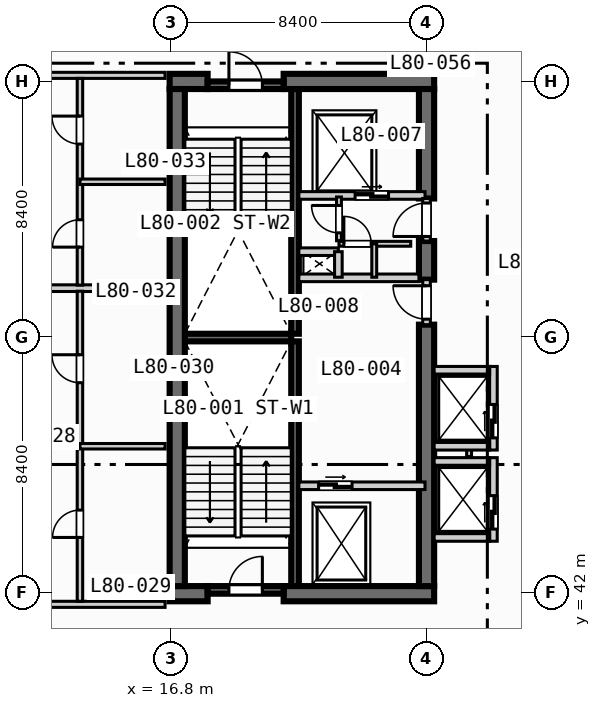
"""IFC4 building model, lengths in metres.
Left out: names, types, materials, properties, quantities, classifications, styles, units other than length and angle.
Written with IfcOpenShell. Run it as: python <this file> out.ifc"""

import sys

from ifc_helpers import new_model, si_unit, direction, frame, frame_2d, origin, place, context, subcontext, project, spatial, rectangle, extrude, element, fill, save


model = new_model("IFC4")
c1 = context("Model", 3, precision=1e-05, world=origin(), true_north=direction((0.0, 1.0)))
c2 = subcontext(c1, "Body", "Model", "MODEL_VIEW")
j1 = project(units=[si_unit("LENGTHUNIT", "METRE"), si_unit("PLANEANGLEUNIT", "RADIAN")], contexts=[c1])
p1 = place(None, origin())
s1 = spatial("IfcSite", under=j1, at=p1, CompositionType="ELEMENT")
p2 = place(p1, origin())
s2 = spatial("IfcBuilding", under=s1, at=p2, CompositionType="ELEMENT")
p3 = place(p2, frame((0.0, 0.0, 324.2)))
s3 = spatial("IfcBuildingStorey", under=s2, at=p3, CompositionType="ELEMENT", Elevation=324.2)
for number, where, z_axis, x_axis in (
    (1, (20.875, 42.2, 0.0), (0.0, 0.0, 1.0), (0.0, 1.0, 0.0)),
    (2, (20.875, 50.5, 0.0), (0.0, 0.0, 1.0), (0.0, 1.0, 0.0)),
):
    element("IfcWall", number, at=place(p3, frame(where, z_axis=z_axis, x_axis=x_axis)), inside=s3, PredefinedType="SOLIDWALL", context=c2, shape_type="SweptSolid", body=[
        extrude(rectangle(XDim=8.05, YDim=0.25, at=frame_2d((4.025, 0.0))), origin(), (0.0, 0.0, 1.0), 3.67),
    ])
p4 = place(p3, frame((17.25, 50.375, 0.0), z_axis=(0.0, 0.0, 1.0), x_axis=(1.0, 0.0, 0.0)))
e3 = element("IfcWall", 3, at=p4, inside=s3, PredefinedType="SOLIDWALL", context=c2, shape_type="SweptSolid", body=[
    extrude(rectangle(XDim=3.5, YDim=0.25, at=frame_2d((1.75, 0.0))), origin(), (0.0, 0.0, 1.0), 3.67),
])
p5 = place(p3, frame((16.75, 41.95, 0.0), z_axis=(0.0, 0.0, 1.0), x_axis=(1.0, 0.0, 0.0)))
e4 = element("IfcWall", 4, at=p5, inside=s3, PredefinedType="SHEAR", context=c2, shape_type="SweptSolid", body=[
    extrude(rectangle(XDim=1.25, YDim=0.5, at=frame_2d((0.625, 0.0))), origin(), (0.0, 0.0, 1.0), 3.67),
])
p6 = place(p3, frame((20.5, 41.95, 0.0), z_axis=(0.0, 0.0, 1.0), x_axis=(1.0, 0.0, 0.0)))
e5 = element("IfcWall", 5, at=p6, inside=s3, PredefinedType="SHEAR", context=c2, shape_type="SweptSolid", body=[
    extrude(rectangle(XDim=4.95, YDim=0.5, at=frame_2d((2.475, 0.0))), origin(), (0.0, 0.0, 1.0), 3.67),
])
p7 = place(p3, frame((16.75, 58.8, 0.0), z_axis=(0.0, 0.0, 1.0), x_axis=(1.0, 0.0, 0.0)))
e6 = element("IfcWall", 6, at=p7, inside=s3, PredefinedType="SHEAR", context=c2, shape_type="SweptSolid", body=[
    extrude(rectangle(XDim=1.25, YDim=0.5, at=frame_2d((0.625, 0.0))), origin(), (0.0, 0.0, 1.0), 3.67),
])
p8 = place(p3, frame((20.5, 58.8, 0.0), z_axis=(0.0, 0.0, 1.0), x_axis=(1.0, 0.0, 0.0)))
e7 = element("IfcWall", 7, at=p8, inside=s3, PredefinedType="SHEAR", context=c2, shape_type="SweptSolid", body=[
    extrude(rectangle(XDim=4.95, YDim=0.5, at=frame_2d((2.475, 0.0))), origin(), (0.0, 0.0, 1.0), 3.67),
])
p9 = place(p3, frame((17.0, 42.2, 0.0), z_axis=(0.0, 0.0, 1.0), x_axis=(0.0, 1.0, 0.0)))
e8 = element("IfcWall", 8, at=p9, inside=s3, PredefinedType="SHEAR", context=c2, shape_type="SweptSolid", body=[
    extrude(rectangle(XDim=16.35, YDim=0.5, at=frame_2d((8.175, 0.0))), origin(), (0.0, 0.0, 1.0), 3.67),
])
p10 = place(p3, frame((25.2, 42.2, 0.0), z_axis=(0.0, 0.0, 1.0), x_axis=(0.0, 1.0, 0.0)))
e9 = element("IfcWall", 9, at=p10, inside=s3, PredefinedType="SHEAR", context=c2, shape_type="SweptSolid", body=[
    extrude(rectangle(XDim=8.6, YDim=0.5, at=frame_2d((4.3, 0.0))), origin(), (0.0, 0.0, 1.0), 3.67),
])
p11 = place(p3, frame((25.2, 52.28, 0.0), z_axis=(0.0, 0.0, 1.0), x_axis=(0.0, 1.0, 0.0)))
e10 = element("IfcWall", 10, at=p11, inside=s3, PredefinedType="SHEAR", context=c2, shape_type="SweptSolid", body=[
    extrude(rectangle(XDim=1.27, YDim=0.5, at=frame_2d((0.635, 0.0))), origin(), (0.0, 0.0, 1.0), 3.67),
])
p12 = place(p3, frame((25.2, 54.95, 0.0), z_axis=(0.0, 0.0, 1.0), x_axis=(0.0, 1.0, 0.0)))
e11 = element("IfcWall", 11, at=p12, inside=s3, PredefinedType="SHEAR", context=c2, shape_type="SweptSolid", body=[
    extrude(rectangle(XDim=3.6, YDim=0.5, at=frame_2d((1.8, 0.0))), origin(), (0.0, 0.0, 1.0), 3.67),
])
p13 = place(p3, frame((18.0, 42.075, 0.0), z_axis=(0.0, 0.0, 1.0), x_axis=(1.0, 0.0, 0.0)))
e12 = element("IfcWall", 12, at=p13, inside=s3, PredefinedType="SOLIDWALL", context=c2, shape_type="SweptSolid", body=[
    extrude(rectangle(XDim=2.5, YDim=0.25, at=frame_2d((1.25, 0.0))), origin(), (0.0, 0.0, 1.0), 3.67),
])
p14 = place(p13, frame((0.7, 0.0, 0.0)))
e13 = element("IfcOpeningElement", 13, at=p14, cuts=e12, PredefinedType="OPENING", context=c2, shape_type="SweptSolid", body=[
    extrude(rectangle(XDim=1.1, YDim=2.15, at=frame_2d((0.55, 1.075))), frame((0.0, 0.135, 0.0), z_axis=(0.0, -1.0, 0.0), x_axis=(1.0, 0.0, 0.0)), (0.0, 0.0, 1.0), 0.27),
])
p15 = place(p3, frame((18.0, 58.675, 0.0), z_axis=(0.0, 0.0, 1.0), x_axis=(1.0, 0.0, 0.0)))
e14 = element("IfcWall", 14, at=p15, inside=s3, PredefinedType="SOLIDWALL", context=c2, shape_type="SweptSolid", body=[
    extrude(rectangle(XDim=2.5, YDim=0.25, at=frame_2d((1.25, 0.0))), origin(), (0.0, 0.0, 1.0), 3.67),
])
p16 = place(p15, frame((0.7, 0.0, 0.0)))
e15 = element("IfcOpeningElement", 15, at=p16, cuts=e14, PredefinedType="OPENING", context=c2, shape_type="SweptSolid", body=[
    extrude(rectangle(XDim=1.1, YDim=2.15, at=frame_2d((0.55, 1.075))), frame((0.0, 0.135, 0.0), z_axis=(0.0, -1.0, 0.0), x_axis=(1.0, 0.0, 0.0)), (0.0, 0.0, 1.0), 0.27),
])
p17 = place(p3, frame((21.0, 45.5, 0.0), z_axis=(0.0, 0.0, 1.0), x_axis=(1.0, 0.0, 0.0)))
e16 = element("IfcWall", 16, at=p17, inside=s3, PredefinedType="SOLIDWALL", context=c2, shape_type="SweptSolid", body=[
    extrude(rectangle(XDim=4.15, YDim=0.25, at=frame_2d((2.075, 0.0))), origin(), (0.0, 0.0, 1.0), 3.67),
])
p18 = place(p17, frame((0.65, 0.0, 0.0)))
e17 = element("IfcOpeningElement", 17, at=p18, cuts=e16, PredefinedType="OPENING", context=c2, shape_type="SweptSolid", body=[
    extrude(rectangle(XDim=1.1, YDim=2.15, at=frame_2d((0.55, 1.075))), frame((0.0, 0.135, 0.0), z_axis=(0.0, -1.0, 0.0), x_axis=(1.0, 0.0, 0.0)), (0.0, 0.0, 1.0), 0.27),
])
p19 = place(p3, frame((25.2, 50.8, 0.0), z_axis=(0.0, 0.0, 1.0), x_axis=(0.0, 1.0, 0.0)))
e18 = element("IfcWall", 18, at=p19, inside=s3, PredefinedType="SOLIDWALL", context=c2, shape_type="SweptSolid", body=[
    extrude(rectangle(XDim=1.48, YDim=0.25, at=frame_2d((0.74, 0.0))), origin(), (0.0, 0.0, 1.0), 3.67),
])
p20 = place(p19, frame((0.18, 0.0, 0.0)))
e19 = element("IfcOpeningElement", 19, at=p20, cuts=e18, PredefinedType="OPENING", context=c2, shape_type="SweptSolid", body=[
    extrude(rectangle(XDim=1.1, YDim=2.15, at=frame_2d((0.55, 1.075))), frame((0.0, 0.135, 0.0), z_axis=(0.0, -1.0, 0.0), x_axis=(1.0, 0.0, 0.0)), (0.0, 0.0, 1.0), 0.27),
])
p21 = place(p3, frame((21.0, 52.34, 0.0), z_axis=(0.0, 0.0, 1.0), x_axis=(1.0, 0.0, 0.0)))
e20 = element("IfcWall", 20, at=p21, inside=s3, PredefinedType="SOLIDWALL", context=c2, shape_type="SweptSolid", body=[
    extrude(rectangle(XDim=3.95, YDim=0.25, at=frame_2d((1.975, 0.0))), origin(), (0.0, 0.0, 1.0), 3.67),
])
p22 = place(p3, frame((21.0, 55.05, 0.0), z_axis=(0.0, 0.0, 1.0), x_axis=(1.0, 0.0, 0.0)))
e21 = element("IfcWall", 21, at=p22, inside=s3, PredefinedType="SOLIDWALL", context=c2, shape_type="SweptSolid", body=[
    extrude(rectangle(XDim=4.15, YDim=0.25, at=frame_2d((2.075, 0.0))), origin(), (0.0, 0.0, 1.0), 3.67),
])
p23 = place(p22, frame((1.85, 0.0, 0.0)))
e22 = element("IfcOpeningElement", 22, at=p23, cuts=e21, PredefinedType="OPENING", context=c2, shape_type="SweptSolid", body=[
    extrude(rectangle(XDim=1.1, YDim=2.15, at=frame_2d((0.55, 1.075))), frame((0.0, 0.135, 0.0), z_axis=(0.0, -1.0, 0.0), x_axis=(1.0, 0.0, 0.0)), (0.0, 0.0, 1.0), 0.27),
])
p24 = place(p3, frame((25.2, 53.55, 0.0), z_axis=(0.0, 0.0, 1.0), x_axis=(0.0, 1.0, 0.0)))
e23 = element("IfcWall", 23, at=p24, inside=s3, PredefinedType="SOLIDWALL", context=c2, shape_type="SweptSolid", body=[
    extrude(rectangle(XDim=1.4, YDim=0.25, at=frame_2d((0.7, 0.0))), origin(), (0.0, 0.0, 1.0), 3.67),
])
p25 = place(p24, frame((0.15, 0.0, 0.0)))
e24 = element("IfcOpeningElement", 24, at=p25, cuts=e23, PredefinedType="OPENING", context=c2, shape_type="SweptSolid", body=[
    extrude(rectangle(XDim=1.1, YDim=2.15, at=frame_2d((0.55, 1.075))), frame((0.0, 0.135, 0.0), z_axis=(0.0, -1.0, 0.0), x_axis=(1.0, 0.0, 0.0)), (0.0, 0.0, 1.0), 0.27),
])
p26 = place(p3, frame((21.0, 53.2, 0.0), z_axis=(0.0, 0.0, 1.0), x_axis=(1.0, 0.0, 0.0)))
e25 = element("IfcWall", 25, at=p26, inside=s3, PredefinedType="SOLIDWALL", context=c2, shape_type="SweptSolid", body=[
    extrude(rectangle(XDim=1.3, YDim=0.25, at=frame_2d((0.65, 0.0))), origin(), (0.0, 0.0, 1.0), 3.67),
])
p27 = place(p3, frame((22.3, 52.36, 0.0), z_axis=(0.0, 0.0, 1.0), x_axis=(0.0, 1.0, 0.0)))
e26 = element("IfcWall", 26, at=p27, inside=s3, PredefinedType="SOLIDWALL", context=c2, shape_type="SweptSolid", body=[
    extrude(rectangle(XDim=0.84, YDim=0.25, at=frame_2d((0.42, 0.0))), origin(), (0.0, 0.0, 1.0), 3.67),
])
p28 = place(p3, frame((22.32, 53.56, 0.0), z_axis=(0.0, 0.0, 1.0), x_axis=(0.0, 1.0, 0.0)))
e27 = element("IfcWall", 27, at=p28, inside=s3, PredefinedType="PARTITIONING", context=c2, shape_type="SweptSolid", body=[
    extrude(rectangle(XDim=1.44, YDim=0.16, at=frame_2d((0.72, 0.0))), origin(), (0.0, 0.0, 1.0), 3.67),
])
p29 = place(p28, frame((0.26, 0.0, 0.0)))
e28 = element("IfcOpeningElement", 28, at=p29, cuts=e27, PredefinedType="OPENING", context=c2, shape_type="SweptSolid", body=[
    extrude(rectangle(XDim=0.9, YDim=2.1, at=frame_2d((0.45, 1.05))), frame((0.0, 0.09, 0.0), z_axis=(0.0, -1.0, 0.0), x_axis=(1.0, 0.0, 0.0)), (0.0, 0.0, 1.0), 0.18),
])
p30 = place(p3, frame((22.32, 53.46, 0.0), z_axis=(0.0, 0.0, 1.0), x_axis=(1.0, 0.0, 0.0)))
e29 = element("IfcWall", 29, at=p30, inside=s3, PredefinedType="PARTITIONING", context=c2, shape_type="SweptSolid", body=[
    extrude(rectangle(XDim=2.36, YDim=0.16, at=frame_2d((1.18, 0.0))), origin(), (0.0, 0.0, 1.0), 3.67),
])
p31 = place(p30, frame((0.16, 0.0, 0.0)))
e30 = element("IfcOpeningElement", 30, at=p31, cuts=e29, PredefinedType="OPENING", context=c2, shape_type="SweptSolid", body=[
    extrude(rectangle(XDim=0.9, YDim=2.1, at=frame_2d((0.45, 1.05))), frame((0.0, 0.09, 0.0), z_axis=(0.0, -1.0, 0.0), x_axis=(1.0, 0.0, 0.0)), (0.0, 0.0, 1.0), 0.18),
])
p32 = place(p3, frame((23.48, 52.36, 0.0), z_axis=(0.0, 0.0, 1.0), x_axis=(0.0, 1.0, 0.0)))
e31 = element("IfcWall", 31, at=p32, inside=s3, PredefinedType="PARTITIONING", context=c2, shape_type="SweptSolid", body=[
    extrude(rectangle(XDim=1.1, YDim=0.16, at=frame_2d((0.55, 0.0))), origin(), (0.0, 0.0, 1.0), 3.67),
])
p33 = place(p3, frame((27.4, 43.675, 0.0), z_axis=(0.0, 0.0, 1.0), x_axis=(0.0, 1.0, 0.0)))
e32 = element("IfcWall", 32, at=p33, inside=s3, PredefinedType="SOLIDWALL", context=c2, shape_type="SweptSolid", body=[
    extrude(rectangle(XDim=2.75, YDim=0.25, at=frame_2d((1.375, 0.0))), origin(), (0.0, 0.0, 1.0), 3.67),
])
p34 = place(p33, frame((0.4, 0.0, 0.0)))
e33 = element("IfcOpeningElement", 33, at=p34, cuts=e32, PredefinedType="OPENING", context=c2, shape_type="SweptSolid", body=[
    extrude(rectangle(XDim=1.1, YDim=2.15, at=frame_2d((0.55, 1.075))), frame((0.0, 0.135, 0.0), z_axis=(0.0, -1.0, 0.0), x_axis=(1.0, 0.0, 0.0)), (0.0, 0.0, 1.0), 0.27),
])
for number, where, z_axis, x_axis in (
    (34, (25.45, 43.8, 0.0), (0.0, 0.0, 1.0), (1.0, 0.0, 0.0)),
    (35, (25.45, 46.3, 0.0), (0.0, 0.0, 1.0), (1.0, 0.0, 0.0)),
):
    element("IfcWall", number, at=place(p3, frame(where, z_axis=z_axis, x_axis=x_axis)), inside=s3, PredefinedType="SOLIDWALL", context=c2, shape_type="SweptSolid", body=[
        extrude(rectangle(XDim=1.825, YDim=0.25, at=frame_2d((0.913, 0.0))), origin(), (0.0, 0.0, 1.0), 3.67),
    ])
p35 = place(p3, frame((26.6, 46.46, 0.0), z_axis=(0.0, 0.0, 1.0), x_axis=(0.0, 1.0, 0.0)))
e36 = element("IfcWall", 36, at=p35, inside=s3, PredefinedType="PARTITIONING", context=c2, shape_type="SweptSolid", body=[
    extrude(rectangle(XDim=0.88, YDim=0.16, at=frame_2d((0.44, 0.0))), origin(), (0.0, 0.0, 1.0), 3.67),
])
p36 = place(p3, frame((27.4, 46.675, 0.0), z_axis=(0.0, 0.0, 1.0), x_axis=(0.0, 1.0, 0.0)))
e37 = element("IfcWall", 37, at=p36, inside=s3, PredefinedType="SOLIDWALL", context=c2, shape_type="SweptSolid", body=[
    extrude(rectangle(XDim=2.75, YDim=0.25, at=frame_2d((1.375, 0.0))), origin(), (0.0, 0.0, 1.0), 3.67),
])
p37 = place(p36, frame((0.4, 0.0, 0.0)))
e38 = element("IfcOpeningElement", 38, at=p37, cuts=e37, PredefinedType="OPENING", context=c2, shape_type="SweptSolid", body=[
    extrude(rectangle(XDim=1.1, YDim=2.15, at=frame_2d((0.55, 1.075))), frame((0.0, 0.135, 0.0), z_axis=(0.0, -1.0, 0.0), x_axis=(1.0, 0.0, 0.0)), (0.0, 0.0, 1.0), 0.27),
])
for number, where, z_axis, x_axis in (
    (39, (25.45, 46.8, 0.0), (0.0, 0.0, 1.0), (1.0, 0.0, 0.0)),
    (40, (25.45, 49.3, 0.0), (0.0, 0.0, 1.0), (1.0, 0.0, 0.0)),
):
    element("IfcWall", number, at=place(p3, frame(where, z_axis=z_axis, x_axis=x_axis)), inside=s3, PredefinedType="SOLIDWALL", context=c2, shape_type="SweptSolid", body=[
        extrude(rectangle(XDim=1.825, YDim=0.25, at=frame_2d((0.913, 0.0))), origin(), (0.0, 0.0, 1.0), 3.67),
    ])
p38 = place(p3, frame((8.65, 41.6, 0.0), z_axis=(0.0, 0.0, 1.0), x_axis=(1.0, 0.0, 0.0)))
e41 = element("IfcWall", 41, at=p38, inside=s3, PredefinedType="PARTITIONING", context=c2, shape_type="SweptSolid", body=[
    extrude(rectangle(XDim=7.95, YDim=0.2, at=frame_2d((3.975, 0.0))), origin(), (0.0, 0.0, 1.0), 3.67),
])
p39 = place(p38, frame((2.0, 0.0, 0.0)))
e42 = element("IfcOpeningElement", 42, at=p39, cuts=e41, PredefinedType="OPENING", context=c2, shape_type="SweptSolid", body=[
    extrude(rectangle(XDim=1.0, YDim=2.15, at=frame_2d((0.5, 1.075))), frame((0.0, 0.11, 0.0), z_axis=(0.0, -1.0, 0.0), x_axis=(1.0, 0.0, 0.0)), (0.0, 0.0, 1.0), 0.22),
])
p40 = place(p3, frame((8.65, 59.0, 0.0), z_axis=(0.0, 0.0, 1.0), x_axis=(1.0, 0.0, 0.0)))
e43 = element("IfcWall", 43, at=p40, inside=s3, PredefinedType="PARTITIONING", context=c2, shape_type="SweptSolid", body=[
    extrude(rectangle(XDim=7.95, YDim=0.2, at=frame_2d((3.975, 0.0))), origin(), (0.0, 0.0, 1.0), 3.07),
])
p41 = place(p40, frame((2.0, 0.0, 0.0)))
e44 = element("IfcOpeningElement", 44, at=p41, cuts=e43, PredefinedType="OPENING", context=c2, shape_type="SweptSolid", body=[
    extrude(rectangle(XDim=1.0, YDim=2.15, at=frame_2d((0.5, 1.075))), frame((0.0, 0.11, 0.0), z_axis=(0.0, -1.0, 0.0), x_axis=(1.0, 0.0, 0.0)), (0.0, 0.0, 1.0), 0.22),
])
p42 = place(p3, frame((8.65, 52.0, 0.0), z_axis=(0.0, 0.0, 1.0), x_axis=(1.0, 0.0, 0.0)))
e45 = element("IfcWall", 45, at=p42, inside=s3, PredefinedType="PARTITIONING", context=c2, shape_type="SweptSolid", body=[
    extrude(rectangle(XDim=7.95, YDim=0.22, at=frame_2d((3.975, 0.0))), origin(), (0.0, 0.0, 1.0), 3.67),
])
p43 = place(p3, frame((13.8, 41.7, 0.0), z_axis=(0.0, 0.0, 1.0), x_axis=(0.0, 1.0, 0.0)))
e46 = element("IfcWall", 46, at=p43, inside=s3, PredefinedType="PLUMBINGWALL", context=c2, shape_type="SweptSolid", body=[
    extrude(rectangle(XDim=10.2, YDim=0.18, at=frame_2d((5.1, 0.0))), origin(), (0.0, 0.0, 1.0), 3.67),
])
p44 = place(p43, frame((2.1, 0.0, 0.0)))
e47 = element("IfcOpeningElement", 47, at=p44, cuts=e46, PredefinedType="OPENING", context=c2, shape_type="SweptSolid", body=[
    extrude(rectangle(XDim=0.9, YDim=2.1, at=frame_2d((0.45, 1.05))), frame((0.0, 0.1, 0.0), z_axis=(0.0, -1.0, 0.0), x_axis=(1.0, 0.0, 0.0)), (0.0, 0.0, 1.0), 0.2),
])
p45 = place(p43, frame((7.19, 0.0, 0.0)))
e48 = element("IfcOpeningElement", 48, at=p45, cuts=e46, PredefinedType="OPENING", context=c2, shape_type="SweptSolid", body=[
    extrude(rectangle(XDim=0.92, YDim=2.1, at=frame_2d((0.46, 1.05))), frame((0.0, 0.1, 0.0), z_axis=(0.0, -1.0, 0.0), x_axis=(1.0, 0.0, 0.0)), (0.0, 0.0, 1.0), 0.2),
])
p46 = place(p3, frame((13.8, 46.8, 0.0), z_axis=(0.0, 0.0, 1.0), x_axis=(1.0, 0.0, 0.0)))
e49 = element("IfcWall", 49, at=p46, inside=s3, PredefinedType="PLUMBINGWALL", context=c2, shape_type="SweptSolid", body=[
    extrude(rectangle(XDim=2.8, YDim=0.18, at=frame_2d((1.4, 0.0))), origin(), (0.0, 0.0, 1.0), 3.67),
])
p47 = place(p3, frame((13.8, 52.1, 0.0), z_axis=(0.0, 0.0, 1.0), x_axis=(0.0, 1.0, 0.0)))
e50 = element("IfcWall", 50, at=p47, inside=s3, PredefinedType="PLUMBINGWALL", context=c2, shape_type="SweptSolid", body=[
    extrude(rectangle(XDim=6.8, YDim=0.18, at=frame_2d((3.4, 0.0))), origin(), (0.0, 0.0, 1.0), 3.67),
])
p48 = place(p47, frame((1.25, 0.0, 0.0)))
e51 = element("IfcOpeningElement", 51, at=p48, cuts=e50, PredefinedType="OPENING", context=c2, shape_type="SweptSolid", body=[
    extrude(rectangle(XDim=0.9, YDim=2.1, at=frame_2d((0.45, 1.05))), frame((0.0, 0.1, 0.0), z_axis=(0.0, -1.0, 0.0), x_axis=(1.0, 0.0, 0.0)), (0.0, 0.0, 1.0), 0.2),
])
p49 = place(p47, frame((4.64, 0.0, 0.0)))
e52 = element("IfcOpeningElement", 52, at=p49, cuts=e50, PredefinedType="OPENING", context=c2, shape_type="SweptSolid", body=[
    extrude(rectangle(XDim=0.92, YDim=2.1, at=frame_2d((0.46, 1.05))), frame((0.0, 0.1, 0.0), z_axis=(0.0, -1.0, 0.0), x_axis=(1.0, 0.0, 0.0)), (0.0, 0.0, 1.0), 0.2),
])
p50 = place(p3, frame((13.8, 55.5, 0.0), z_axis=(0.0, 0.0, 1.0), x_axis=(1.0, 0.0, 0.0)))
e53 = element("IfcWall", 53, at=p50, inside=s3, PredefinedType="PLUMBINGWALL", context=c2, shape_type="SweptSolid", body=[
    extrude(rectangle(XDim=2.8, YDim=0.18, at=frame_2d((1.4, 0.0))), origin(), (0.0, 0.0, 1.0), 3.67),
])
p51 = place(p14, origin())
e54 = element("IfcDoor", 54, at=p51, inside=s3, OperationType="SINGLE_SWING_RIGHT", PredefinedType="DOOR", context=c2, shape_type="SweptSolid", body=[
    extrude(rectangle(XDim=1.1, YDim=2.15, at=frame_2d((0.55, 1.075))), frame((0.0, 0.025, 0.0), z_axis=(0.0, -1.0, 0.0), x_axis=(1.0, 0.0, 0.0)), (0.0, 0.0, 1.0), 0.05),
])
fill(e13, e54)
p52 = place(p16, origin())
e55 = element("IfcDoor", 55, at=p52, inside=s3, OperationType="SINGLE_SWING_LEFT", PredefinedType="DOOR", context=c2, shape_type="SweptSolid", body=[
    extrude(rectangle(XDim=1.1, YDim=2.15, at=frame_2d((0.55, 1.075))), frame((0.0, 0.025, 0.0), z_axis=(0.0, -1.0, 0.0), x_axis=(1.0, 0.0, 0.0)), (0.0, 0.0, 1.0), 0.05),
])
fill(e15, e55)
p53 = place(p18, origin())
e56 = element("IfcDoor", 56, at=p53, inside=s3, OperationType="SLIDING_TO_LEFT", PredefinedType="DOOR", context=c2, shape_type="SweptSolid", body=[
    extrude(rectangle(XDim=1.1, YDim=2.15, at=frame_2d((0.55, 1.075))), frame((0.0, 0.025, 0.0), z_axis=(0.0, -1.0, 0.0), x_axis=(1.0, 0.0, 0.0)), (0.0, 0.0, 1.0), 0.05),
])
fill(e17, e56)
p54 = place(p20, origin())
e57 = element("IfcDoor", 57, at=p54, inside=s3, OperationType="SINGLE_SWING_RIGHT", PredefinedType="DOOR", context=c2, shape_type="SweptSolid", body=[
    extrude(rectangle(XDim=1.1, YDim=2.15, at=frame_2d((0.55, 1.075))), frame((0.0, 0.025, 0.0), z_axis=(0.0, -1.0, 0.0), x_axis=(1.0, 0.0, 0.0)), (0.0, 0.0, 1.0), 0.05),
])
fill(e19, e57)
p55 = place(p23, origin())
e58 = element("IfcDoor", 58, at=p55, inside=s3, OperationType="SLIDING_TO_LEFT", PredefinedType="DOOR", context=c2, shape_type="SweptSolid", body=[
    extrude(rectangle(XDim=1.1, YDim=2.15, at=frame_2d((0.55, 1.075))), frame((0.0, 0.025, 0.0), z_axis=(0.0, -1.0, 0.0), x_axis=(1.0, 0.0, 0.0)), (0.0, 0.0, 1.0), 0.05),
])
fill(e22, e58)
p56 = place(p25, origin())
e59 = element("IfcDoor", 59, at=p56, inside=s3, OperationType="SINGLE_SWING_LEFT", PredefinedType="DOOR", context=c2, shape_type="SweptSolid", body=[
    extrude(rectangle(XDim=1.1, YDim=2.15, at=frame_2d((0.55, 1.075))), frame((0.0, 0.025, 0.0), z_axis=(0.0, -1.0, 0.0), x_axis=(1.0, 0.0, 0.0)), (0.0, 0.0, 1.0), 0.05),
])
fill(e24, e59)
p57 = place(p29, origin())
e60 = element("IfcDoor", 60, at=p57, inside=s3, OperationType="SINGLE_SWING_RIGHT", PredefinedType="DOOR", context=c2, shape_type="SweptSolid", body=[
    extrude(rectangle(XDim=0.9, YDim=2.1, at=frame_2d((0.45, 1.05))), frame((0.0, 0.025, 0.0), z_axis=(0.0, -1.0, 0.0), x_axis=(1.0, 0.0, 0.0)), (0.0, 0.0, 1.0), 0.05),
])
fill(e28, e60)
p58 = place(p31, origin())
e61 = element("IfcDoor", 61, at=p58, inside=s3, OperationType="SINGLE_SWING_LEFT", PredefinedType="DOOR", context=c2, shape_type="SweptSolid", body=[
    extrude(rectangle(XDim=0.9, YDim=2.1, at=frame_2d((0.45, 1.05))), frame((0.0, 0.025, 0.0), z_axis=(0.0, -1.0, 0.0), x_axis=(1.0, 0.0, 0.0)), (0.0, 0.0, 1.0), 0.05),
])
fill(e30, e61)
p59 = place(p34, origin())
e62 = element("IfcDoor", 62, at=p59, inside=s3, OperationType="SLIDING_TO_LEFT", PredefinedType="DOOR", context=c2, shape_type="SweptSolid", body=[
    extrude(rectangle(XDim=1.1, YDim=2.15, at=frame_2d((0.55, 1.075))), frame((0.0, 0.025, 0.0), z_axis=(0.0, -1.0, 0.0), x_axis=(1.0, 0.0, 0.0)), (0.0, 0.0, 1.0), 0.05),
])
fill(e33, e62)
p60 = place(p37, origin())
e63 = element("IfcDoor", 63, at=p60, inside=s3, OperationType="SLIDING_TO_LEFT", PredefinedType="DOOR", context=c2, shape_type="SweptSolid", body=[
    extrude(rectangle(XDim=1.1, YDim=2.15, at=frame_2d((0.55, 1.075))), frame((0.0, 0.025, 0.0), z_axis=(0.0, -1.0, 0.0), x_axis=(1.0, 0.0, 0.0)), (0.0, 0.0, 1.0), 0.05),
])
fill(e38, e63)
p61 = place(p44, origin())
e64 = element("IfcDoor", 64, at=p61, inside=s3, OperationType="SINGLE_SWING_LEFT", PredefinedType="DOOR", context=c2, shape_type="SweptSolid", body=[
    extrude(rectangle(XDim=0.9, YDim=2.1, at=frame_2d((0.45, 1.05))), frame((0.0, 0.025, 0.0), z_axis=(0.0, -1.0, 0.0), x_axis=(1.0, 0.0, 0.0)), (0.0, 0.0, 1.0), 0.05),
])
fill(e47, e64)
p62 = place(p45, origin())
e65 = element("IfcDoor", 65, at=p62, inside=s3, OperationType="SINGLE_SWING_RIGHT", PredefinedType="DOOR", context=c2, shape_type="SweptSolid", body=[
    extrude(rectangle(XDim=0.92, YDim=2.1, at=frame_2d((0.46, 1.05))), frame((0.0, 0.025, 0.0), z_axis=(0.0, -1.0, 0.0), x_axis=(1.0, 0.0, 0.0)), (0.0, 0.0, 1.0), 0.05),
])
fill(e48, e65)
p63 = place(p48, origin())
e66 = element("IfcDoor", 66, at=p63, inside=s3, OperationType="SINGLE_SWING_LEFT", PredefinedType="DOOR", context=c2, shape_type="SweptSolid", body=[
    extrude(rectangle(XDim=0.9, YDim=2.1, at=frame_2d((0.45, 1.05))), frame((0.0, 0.025, 0.0), z_axis=(0.0, -1.0, 0.0), x_axis=(1.0, 0.0, 0.0)), (0.0, 0.0, 1.0), 0.05),
])
fill(e51, e66)
p64 = place(p49, origin())
e67 = element("IfcDoor", 67, at=p64, inside=s3, OperationType="SINGLE_SWING_RIGHT", PredefinedType="DOOR", context=c2, shape_type="SweptSolid", body=[
    extrude(rectangle(XDim=0.92, YDim=2.1, at=frame_2d((0.46, 1.05))), frame((0.0, 0.025, 0.0), z_axis=(0.0, -1.0, 0.0), x_axis=(1.0, 0.0, 0.0)), (0.0, 0.0, 1.0), 0.05),
])
fill(e52, e67)
save(model, sys.argv[1])
